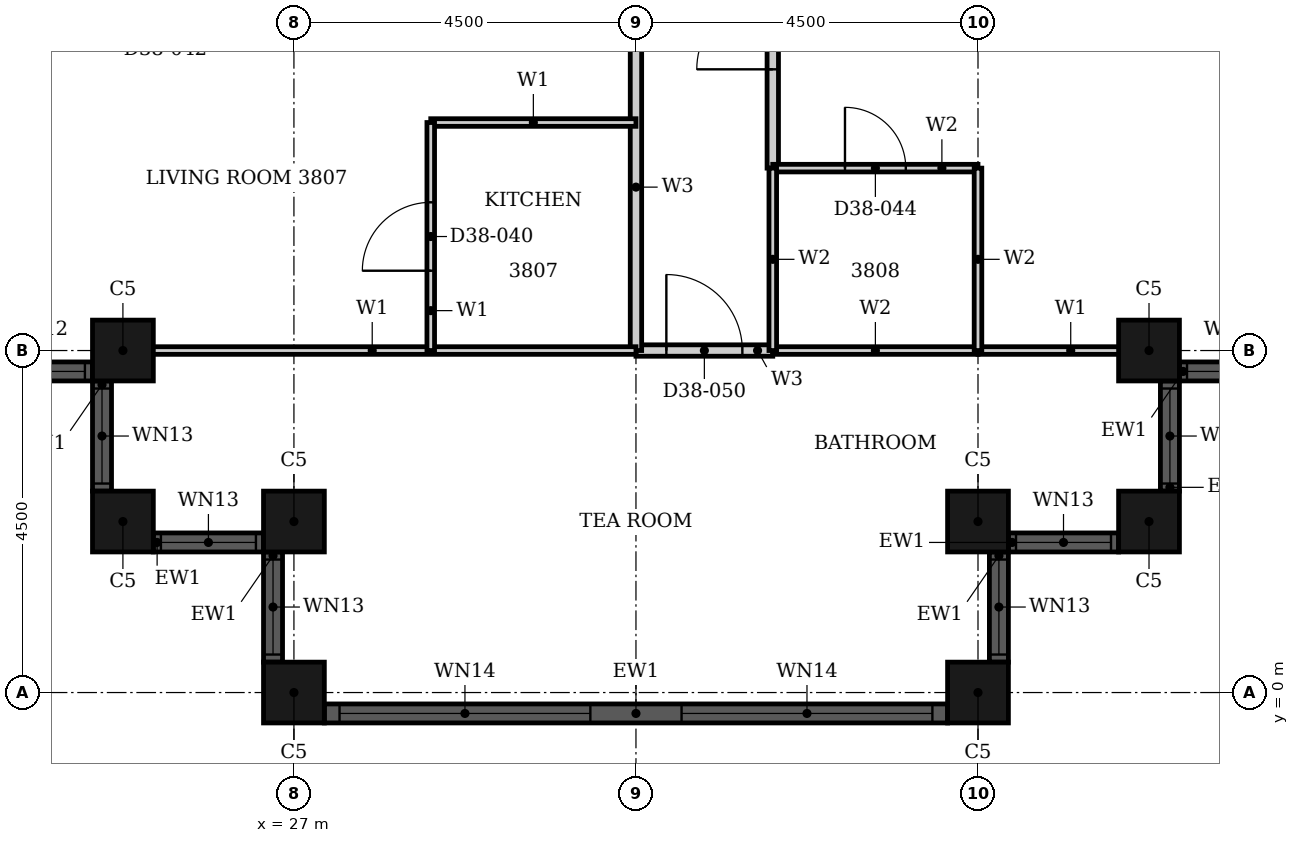
"""IFC4 building model, lengths in metres.
Left out: names, types, materials, properties, quantities, classifications, styles, units other than length and angle.
Written with IfcOpenShell. Run it as: python <this file> out.ifc"""

import sys

from ifc_helpers import new_model, si_unit, direction, frame, frame_2d, origin, origin_2d, place, context, subcontext, project, spatial, rectangle, hollow_rectangle, extrude, element, fill, save


model = new_model("IFC4")
c1 = context("Model", 3, precision=1e-05, world=origin(), true_north=direction((0.0, 1.0)))
c2 = subcontext(c1, "Body", "Model", "MODEL_VIEW")
j1 = project(units=[si_unit("LENGTHUNIT", "METRE"), si_unit("PLANEANGLEUNIT", "RADIAN")], contexts=[c1])
p1 = place(None, origin())
s1 = spatial("IfcSite", under=j1, at=p1, CompositionType="ELEMENT")
p2 = place(p1, origin())
s2 = spatial("IfcBuilding", under=s1, at=p2, CompositionType="ELEMENT")
p3 = place(p2, frame((0.0, 0.0, 154.3)))
s3 = spatial("IfcBuildingStorey", under=s2, at=p3, CompositionType="ELEMENT", Elevation=154.3)
for number, where, z_axis, x_axis in (
    (1, (24.75, 4.5, 0.0), (0.0, 0.0, 1.0), (1.0, 0.0, 0.0)),
    (2, (24.75, 2.25, 0.0), (0.0, 0.0, 1.0), (1.0, 0.0, 0.0)),
    (3, (27.0, 2.25, 0.0), (0.0, 0.0, 1.0), (1.0, 0.0, 0.0)),
    (4, (27.0, 0.0, 0.0), (0.0, 0.0, 1.0), (1.0, 0.0, 0.0)),
    (5, (36.0, 0.0, 0.0), (0.0, 0.0, 1.0), (1.0, 0.0, 0.0)),
    (6, (36.0, 2.25, 0.0), (0.0, 0.0, 1.0), (1.0, 0.0, 0.0)),
    (7, (38.25, 2.25, 0.0), (0.0, 0.0, 1.0), (1.0, 0.0, 0.0)),
    (8, (38.25, 4.5, 0.0), (0.0, 0.0, 1.0), (1.0, 0.0, 0.0)),
):
    element("IfcColumn", number, at=place(p3, frame(where, z_axis=z_axis, x_axis=x_axis)), inside=s3, PredefinedType="COLUMN", context=c2, shape_type="SweptSolid", body=[
        extrude(hollow_rectangle(XDim=0.8, YDim=0.8, WallThickness=0.025, at=origin_2d()), origin(), (0.0, 0.0, 1.0), 3.7),
    ])
p4 = place(p3, frame((22.9, 4.225, 0.0), z_axis=(0.0, 0.0, 1.0), x_axis=(1.0, 0.0, 0.0)))
e9 = element("IfcWall", 9, at=p4, inside=s3, PredefinedType="SOLIDWALL", context=c2, shape_type="SweptSolid", body=[
    extrude(rectangle(XDim=1.45, YDim=0.25, at=frame_2d((0.725, 0.0))), origin(), (0.0, 0.0, 1.0), 3.7),
])
p5 = place(p4, frame((0.1, 0.0, 0.9)))
e10 = element("IfcOpeningElement", 10, at=p5, cuts=e9, PredefinedType="OPENING", context=c2, shape_type="SweptSolid", body=[
    extrude(rectangle(XDim=1.25, YDim=2.08, at=frame_2d((0.625, 1.04))), frame((0.0, 0.135, 0.0), z_axis=(0.0, -1.0, 0.0), x_axis=(1.0, 0.0, 0.0)), (0.0, 0.0, 1.0), 0.27),
])
p6 = place(p3, frame((24.475, 4.1, 0.0), z_axis=(0.0, 0.0, 1.0), x_axis=(0.0, -1.0, 0.0)))
e11 = element("IfcWall", 11, at=p6, inside=s3, PredefinedType="SOLIDWALL", context=c2, shape_type="SweptSolid", body=[
    extrude(rectangle(XDim=1.45, YDim=0.25, at=frame_2d((0.725, 0.0))), origin(), (0.0, 0.0, 1.0), 3.7),
])
p7 = place(p6, frame((0.1, 0.0, 0.9)))
e12 = element("IfcOpeningElement", 12, at=p7, cuts=e11, PredefinedType="OPENING", context=c2, shape_type="SweptSolid", body=[
    extrude(rectangle(XDim=1.25, YDim=1.85, at=frame_2d((0.625, 0.925))), frame((0.0, 0.135, 0.0), z_axis=(0.0, -1.0, 0.0), x_axis=(1.0, 0.0, 0.0)), (0.0, 0.0, 1.0), 0.27),
])
p8 = place(p3, frame((25.15, 1.975, 0.0), z_axis=(0.0, 0.0, 1.0), x_axis=(1.0, 0.0, 0.0)))
e13 = element("IfcWall", 13, at=p8, inside=s3, PredefinedType="SOLIDWALL", context=c2, shape_type="SweptSolid", body=[
    extrude(rectangle(XDim=1.45, YDim=0.25, at=frame_2d((0.725, 0.0))), origin(), (0.0, 0.0, 1.0), 3.7),
])
p9 = place(p8, frame((0.1, 0.0, 0.9)))
e14 = element("IfcOpeningElement", 14, at=p9, cuts=e13, PredefinedType="OPENING", context=c2, shape_type="SweptSolid", body=[
    extrude(rectangle(XDim=1.25, YDim=1.85, at=frame_2d((0.625, 0.925))), frame((0.0, 0.135, 0.0), z_axis=(0.0, -1.0, 0.0), x_axis=(1.0, 0.0, 0.0)), (0.0, 0.0, 1.0), 0.27),
])
p10 = place(p3, frame((26.725, 1.85, 0.0), z_axis=(0.0, 0.0, 1.0), x_axis=(0.0, -1.0, 0.0)))
e15 = element("IfcWall", 15, at=p10, inside=s3, PredefinedType="SOLIDWALL", context=c2, shape_type="SweptSolid", body=[
    extrude(rectangle(XDim=1.45, YDim=0.25, at=frame_2d((0.725, 0.0))), origin(), (0.0, 0.0, 1.0), 3.7),
])
p11 = place(p10, frame((0.1, 0.0, 0.9)))
e16 = element("IfcOpeningElement", 16, at=p11, cuts=e15, PredefinedType="OPENING", context=c2, shape_type="SweptSolid", body=[
    extrude(rectangle(XDim=1.25, YDim=1.85, at=frame_2d((0.625, 0.925))), frame((0.0, 0.135, 0.0), z_axis=(0.0, -1.0, 0.0), x_axis=(1.0, 0.0, 0.0)), (0.0, 0.0, 1.0), 0.27),
])
p12 = place(p3, frame((27.4, -0.275, 0.0), z_axis=(0.0, 0.0, 1.0), x_axis=(1.0, 0.0, 0.0)))
e17 = element("IfcWall", 17, at=p12, inside=s3, PredefinedType="SOLIDWALL", context=c2, shape_type="SweptSolid", body=[
    extrude(rectangle(XDim=8.2, YDim=0.25, at=frame_2d((4.1, 0.0))), origin(), (0.0, 0.0, 1.0), 3.7),
])
p13 = place(p12, frame((0.2, 0.0, 0.45)))
e18 = element("IfcOpeningElement", 18, at=p13, cuts=e17, PredefinedType="OPENING", context=c2, shape_type="SweptSolid", body=[
    extrude(rectangle(XDim=3.3, YDim=2.53, at=frame_2d((1.65, 1.265))), frame((0.0, 0.135, 0.0), z_axis=(0.0, -1.0, 0.0), x_axis=(1.0, 0.0, 0.0)), (0.0, 0.0, 1.0), 0.27),
])
p14 = place(p12, frame((4.7, 0.0, 0.45)))
e19 = element("IfcOpeningElement", 19, at=p14, cuts=e17, PredefinedType="OPENING", context=c2, shape_type="SweptSolid", body=[
    extrude(rectangle(XDim=3.3, YDim=2.53, at=frame_2d((1.65, 1.265))), frame((0.0, 0.135, 0.0), z_axis=(0.0, -1.0, 0.0), x_axis=(1.0, 0.0, 0.0)), (0.0, 0.0, 1.0), 0.27),
])
p15 = place(p3, frame((36.275, 0.4, 0.0), z_axis=(0.0, 0.0, 1.0), x_axis=(0.0, 1.0, 0.0)))
e20 = element("IfcWall", 20, at=p15, inside=s3, PredefinedType="SOLIDWALL", context=c2, shape_type="SweptSolid", body=[
    extrude(rectangle(XDim=1.45, YDim=0.25, at=frame_2d((0.725, 0.0))), origin(), (0.0, 0.0, 1.0), 3.7),
])
p16 = place(p15, frame((0.1, 0.0, 0.9)))
e21 = element("IfcOpeningElement", 21, at=p16, cuts=e20, PredefinedType="OPENING", context=c2, shape_type="SweptSolid", body=[
    extrude(rectangle(XDim=1.25, YDim=1.85, at=frame_2d((0.625, 0.925))), frame((0.0, 0.135, 0.0), z_axis=(0.0, -1.0, 0.0), x_axis=(1.0, 0.0, 0.0)), (0.0, 0.0, 1.0), 0.27),
])
p17 = place(p3, frame((36.4, 1.975, 0.0), z_axis=(0.0, 0.0, 1.0), x_axis=(1.0, 0.0, 0.0)))
e22 = element("IfcWall", 22, at=p17, inside=s3, PredefinedType="SOLIDWALL", context=c2, shape_type="SweptSolid", body=[
    extrude(rectangle(XDim=1.45, YDim=0.25, at=frame_2d((0.725, 0.0))), origin(), (0.0, 0.0, 1.0), 3.7),
])
p18 = place(p17, frame((0.1, 0.0, 0.9)))
e23 = element("IfcOpeningElement", 23, at=p18, cuts=e22, PredefinedType="OPENING", context=c2, shape_type="SweptSolid", body=[
    extrude(rectangle(XDim=1.25, YDim=1.85, at=frame_2d((0.625, 0.925))), frame((0.0, 0.135, 0.0), z_axis=(0.0, -1.0, 0.0), x_axis=(1.0, 0.0, 0.0)), (0.0, 0.0, 1.0), 0.27),
])
p19 = place(p3, frame((38.525, 2.65, 0.0), z_axis=(0.0, 0.0, 1.0), x_axis=(0.0, 1.0, 0.0)))
e24 = element("IfcWall", 24, at=p19, inside=s3, PredefinedType="SOLIDWALL", context=c2, shape_type="SweptSolid", body=[
    extrude(rectangle(XDim=1.45, YDim=0.25, at=frame_2d((0.725, 0.0))), origin(), (0.0, 0.0, 1.0), 3.7),
])
p20 = place(p19, frame((0.1, 0.0, 0.9)))
e25 = element("IfcOpeningElement", 25, at=p20, cuts=e24, PredefinedType="OPENING", context=c2, shape_type="SweptSolid", body=[
    extrude(rectangle(XDim=1.25, YDim=1.85, at=frame_2d((0.625, 0.925))), frame((0.0, 0.135, 0.0), z_axis=(0.0, -1.0, 0.0), x_axis=(1.0, 0.0, 0.0)), (0.0, 0.0, 1.0), 0.27),
])
p21 = place(p3, frame((38.65, 4.225, 0.0), z_axis=(0.0, 0.0, 1.0), x_axis=(1.0, 0.0, 0.0)))
e26 = element("IfcWall", 26, at=p21, inside=s3, PredefinedType="SOLIDWALL", context=c2, shape_type="SweptSolid", body=[
    extrude(rectangle(XDim=1.45, YDim=0.25, at=frame_2d((0.725, 0.0))), origin(), (0.0, 0.0, 1.0), 3.7),
])
p22 = place(p21, frame((0.1, 0.0, 0.9)))
e27 = element("IfcOpeningElement", 27, at=p22, cuts=e26, PredefinedType="OPENING", context=c2, shape_type="SweptSolid", body=[
    extrude(rectangle(XDim=1.25, YDim=2.08, at=frame_2d((0.625, 1.04))), frame((0.0, 0.135, 0.0), z_axis=(0.0, -1.0, 0.0), x_axis=(1.0, 0.0, 0.0)), (0.0, 0.0, 1.0), 0.27),
])
p23 = place(p3, frame((31.5, 4.5, 0.0), z_axis=(0.0, 0.0, 1.0), x_axis=(1.0, 0.0, 0.0)))
e28 = element("IfcWall", 28, at=p23, inside=s3, PredefinedType="PARTITIONING", context=c2, shape_type="SweptSolid", body=[
    extrude(rectangle(XDim=1.8, YDim=0.15, at=frame_2d((0.9, 0.0))), origin(), (0.0, 0.0, 1.0), 3.4),
])
p24 = place(p23, frame((0.4, 0.0, 0.0)))
e29 = element("IfcOpeningElement", 29, at=p24, cuts=e28, PredefinedType="OPENING", context=c2, shape_type="SweptSolid", body=[
    extrude(rectangle(XDim=1.0, YDim=2.1, at=frame_2d((0.5, 1.05))), frame((0.0, 0.085, 0.0), z_axis=(0.0, -1.0, 0.0), x_axis=(1.0, 0.0, 0.0)), (0.0, 0.0, 1.0), 0.17),
])
p25 = place(p3, frame((31.5, 4.5, 0.0), z_axis=(0.0, 0.0, 1.0), x_axis=(0.0, 1.0, 0.0)))
e30 = element("IfcWall", 30, at=p25, inside=s3, PredefinedType="PARTITIONING", context=c2, shape_type="SweptSolid", body=[
    extrude(rectangle(XDim=6.6, YDim=0.15, at=frame_2d((3.3, 0.0))), origin(), (0.0, 0.0, 1.0), 2.68),
])
p26 = place(p25, frame((4.3, 0.0, 0.0)))
e31 = element("IfcOpeningElement", 31, at=p26, cuts=e30, PredefinedType="OPENING", context=c2, shape_type="SweptSolid", body=[
    extrude(rectangle(XDim=1.0, YDim=2.2, at=frame_2d((0.5, 1.1))), frame((0.0, 0.085, 0.0), z_axis=(0.0, -1.0, 0.0), x_axis=(1.0, 0.0, 0.0)), (0.0, 0.0, 1.0), 0.17),
])
p27 = place(p3, frame((33.3, 6.9, 0.0), z_axis=(0.0, 0.0, 1.0), x_axis=(0.0, 1.0, 0.0)))
e32 = element("IfcWall", 32, at=p27, inside=s3, PredefinedType="PARTITIONING", context=c2, shape_type="SweptSolid", body=[
    extrude(rectangle(XDim=13.799, YDim=0.15, at=frame_2d((6.899, 0.0))), origin(), (0.0, 0.0, 1.0), 3.4),
])
p28 = place(p27, frame((9.699, 0.0, 0.0)))
e33 = element("IfcOpeningElement", 33, at=p28, cuts=e32, PredefinedType="OPENING", context=c2, shape_type="SweptSolid", body=[
    extrude(rectangle(XDim=1.0, YDim=2.2, at=frame_2d((0.5, 1.1))), frame((0.0, 0.085, 0.0), z_axis=(0.0, -1.0, 0.0), x_axis=(1.0, 0.0, 0.0)), (0.0, 0.0, 1.0), 0.17),
])
p29 = place(p27, frame((1.3, 0.0, 0.0)))
e34 = element("IfcOpeningElement", 34, at=p29, cuts=e32, PredefinedType="OPENING", context=c2, shape_type="SweptSolid", body=[
    extrude(rectangle(XDim=1.0, YDim=2.2, at=frame_2d((0.5, 1.1))), frame((0.0, 0.085, 0.0), z_axis=(0.0, -1.0, 0.0), x_axis=(1.0, 0.0, 0.0)), (0.0, 0.0, 1.0), 0.17),
])
p30 = place(p3, frame((36.0, 4.5, 0.0), z_axis=(0.0, 0.0, 1.0), x_axis=(1.0, 0.0, 0.0)))
e35 = element("IfcWall", 35, at=p30, inside=s3, PredefinedType="PARTITIONING", context=c2, shape_type="SweptSolid", body=[
    extrude(rectangle(XDim=2.44, YDim=0.1, at=frame_2d((1.22, 0.0))), origin(), (0.0, 0.0, 1.0), 3.4),
])
p31 = place(p3, frame((24.56, 4.5, 0.0), z_axis=(0.0, 0.0, 1.0), x_axis=(1.0, 0.0, 0.0)))
e36 = element("IfcWall", 36, at=p31, inside=s3, PredefinedType="PARTITIONING", context=c2, shape_type="SweptSolid", body=[
    extrude(rectangle(XDim=6.94, YDim=0.1, at=frame_2d((3.47, 0.0))), origin(), (0.0, 0.0, 1.0), 3.4),
])
p32 = place(p3, frame((28.8, 7.5, 0.0), z_axis=(0.0, 0.0, 1.0), x_axis=(1.0, 0.0, 0.0)))
e37 = element("IfcWall", 37, at=p32, inside=s3, PredefinedType="PARTITIONING", context=c2, shape_type="SweptSolid", body=[
    extrude(rectangle(XDim=2.7, YDim=0.1, at=frame_2d((1.35, 0.0))), origin(), (0.0, 0.0, 1.0), 3.4),
])
p33 = place(p3, frame((28.8, 4.5, 0.0), z_axis=(0.0, 0.0, 1.0), x_axis=(0.0, 1.0, 0.0)))
e38 = element("IfcWall", 38, at=p33, inside=s3, PredefinedType="PARTITIONING", context=c2, shape_type="SweptSolid", body=[
    extrude(rectangle(XDim=3.0, YDim=0.1, at=frame_2d((1.5, 0.0))), origin(), (0.0, 0.0, 1.0), 3.4),
])
p34 = place(p33, frame((1.05, 0.0, 0.0)))
e39 = element("IfcOpeningElement", 39, at=p34, cuts=e38, PredefinedType="OPENING", context=c2, shape_type="SweptSolid", body=[
    extrude(rectangle(XDim=0.9, YDim=2.1, at=frame_2d((0.45, 1.05))), frame((0.0, 0.06, 0.0), z_axis=(0.0, -1.0, 0.0), x_axis=(1.0, 0.0, 0.0)), (0.0, 0.0, 1.0), 0.12),
])
p35 = place(p3, frame((33.3, 4.5, 0.0), z_axis=(0.0, 0.0, 1.0), x_axis=(1.0, 0.0, 0.0)))
e40 = element("IfcWall", 40, at=p35, inside=s3, PredefinedType="PARTITIONING", context=c2, shape_type="SweptSolid", body=[
    extrude(rectangle(XDim=2.7, YDim=0.1, at=frame_2d((1.35, 0.0))), origin(), (0.0, 0.0, 1.0), 3.4),
])
p36 = place(p3, frame((33.3, 6.9, 0.0), z_axis=(0.0, 0.0, 1.0), x_axis=(1.0, 0.0, 0.0)))
e41 = element("IfcWall", 41, at=p36, inside=s3, PredefinedType="PARTITIONING", context=c2, shape_type="SweptSolid", body=[
    extrude(rectangle(XDim=2.7, YDim=0.1, at=frame_2d((1.35, 0.0))), origin(), (0.0, 0.0, 1.0), 3.4),
])
p37 = place(p36, frame((0.95, 0.0, 0.0)))
e42 = element("IfcOpeningElement", 42, at=p37, cuts=e41, PredefinedType="OPENING", context=c2, shape_type="SweptSolid", body=[
    extrude(rectangle(XDim=0.8, YDim=2.1, at=frame_2d((0.4, 1.05))), frame((0.0, 0.06, 0.0), z_axis=(0.0, -1.0, 0.0), x_axis=(1.0, 0.0, 0.0)), (0.0, 0.0, 1.0), 0.12),
])
p38 = place(p3, frame((33.3, 4.5, 0.0), z_axis=(0.0, 0.0, 1.0), x_axis=(0.0, 1.0, 0.0)))
e43 = element("IfcWall", 43, at=p38, inside=s3, PredefinedType="PARTITIONING", context=c2, shape_type="SweptSolid", body=[
    extrude(rectangle(XDim=2.4, YDim=0.1, at=frame_2d((1.2, 0.0))), origin(), (0.0, 0.0, 1.0), 3.4),
])
p39 = place(p3, frame((36.0, 4.5, 0.0), z_axis=(0.0, 0.0, 1.0), x_axis=(0.0, 1.0, 0.0)))
e44 = element("IfcWall", 44, at=p39, inside=s3, PredefinedType="PARTITIONING", context=c2, shape_type="SweptSolid", body=[
    extrude(rectangle(XDim=2.4, YDim=0.1, at=frame_2d((1.2, 0.0))), origin(), (0.0, 0.0, 1.0), 2.68),
])
p40 = place(p5, origin())
e45 = element("IfcWindow", 45, at=p40, inside=s3, PartitioningType="SINGLE_PANEL", PredefinedType="WINDOW", context=c2, shape_type="SweptSolid", body=[
    extrude(rectangle(XDim=1.25, YDim=2.08, at=frame_2d((0.625, 1.04))), frame((0.0, 0.03, 0.0), z_axis=(0.0, -1.0, 0.0), x_axis=(1.0, 0.0, 0.0)), (0.0, 0.0, 1.0), 0.06),
])
fill(e10, e45)
p41 = place(p7, origin())
e46 = element("IfcWindow", 46, at=p41, inside=s3, PartitioningType="SINGLE_PANEL", PredefinedType="WINDOW", context=c2, shape_type="SweptSolid", body=[
    extrude(rectangle(XDim=1.25, YDim=1.85, at=frame_2d((0.625, 0.925))), frame((0.0, 0.03, 0.0), z_axis=(0.0, -1.0, 0.0), x_axis=(1.0, 0.0, 0.0)), (0.0, 0.0, 1.0), 0.06),
])
fill(e12, e46)
p42 = place(p9, origin())
e47 = element("IfcWindow", 47, at=p42, inside=s3, PartitioningType="SINGLE_PANEL", PredefinedType="WINDOW", context=c2, shape_type="SweptSolid", body=[
    extrude(rectangle(XDim=1.25, YDim=1.85, at=frame_2d((0.625, 0.925))), frame((0.0, 0.03, 0.0), z_axis=(0.0, -1.0, 0.0), x_axis=(1.0, 0.0, 0.0)), (0.0, 0.0, 1.0), 0.06),
])
fill(e14, e47)
p43 = place(p11, origin())
e48 = element("IfcWindow", 48, at=p43, inside=s3, PartitioningType="SINGLE_PANEL", PredefinedType="WINDOW", context=c2, shape_type="SweptSolid", body=[
    extrude(rectangle(XDim=1.25, YDim=1.85, at=frame_2d((0.625, 0.925))), frame((0.0, 0.03, 0.0), z_axis=(0.0, -1.0, 0.0), x_axis=(1.0, 0.0, 0.0)), (0.0, 0.0, 1.0), 0.06),
])
fill(e16, e48)
p44 = place(p13, origin())
e49 = element("IfcWindow", 49, at=p44, inside=s3, PartitioningType="SINGLE_PANEL", PredefinedType="WINDOW", context=c2, shape_type="SweptSolid", body=[
    extrude(rectangle(XDim=3.3, YDim=2.53, at=frame_2d((1.65, 1.265))), frame((0.0, 0.03, 0.0), z_axis=(0.0, -1.0, 0.0), x_axis=(1.0, 0.0, 0.0)), (0.0, 0.0, 1.0), 0.06),
])
fill(e18, e49)
p45 = place(p14, origin())
e50 = element("IfcWindow", 50, at=p45, inside=s3, PartitioningType="SINGLE_PANEL", PredefinedType="WINDOW", context=c2, shape_type="SweptSolid", body=[
    extrude(rectangle(XDim=3.3, YDim=2.53, at=frame_2d((1.65, 1.265))), frame((0.0, 0.03, 0.0), z_axis=(0.0, -1.0, 0.0), x_axis=(1.0, 0.0, 0.0)), (0.0, 0.0, 1.0), 0.06),
])
fill(e19, e50)
p46 = place(p16, origin())
e51 = element("IfcWindow", 51, at=p46, inside=s3, PartitioningType="SINGLE_PANEL", PredefinedType="WINDOW", context=c2, shape_type="SweptSolid", body=[
    extrude(rectangle(XDim=1.25, YDim=1.85, at=frame_2d((0.625, 0.925))), frame((0.0, 0.03, 0.0), z_axis=(0.0, -1.0, 0.0), x_axis=(1.0, 0.0, 0.0)), (0.0, 0.0, 1.0), 0.06),
])
fill(e21, e51)
p47 = place(p18, origin())
e52 = element("IfcWindow", 52, at=p47, inside=s3, PartitioningType="SINGLE_PANEL", PredefinedType="WINDOW", context=c2, shape_type="SweptSolid", body=[
    extrude(rectangle(XDim=1.25, YDim=1.85, at=frame_2d((0.625, 0.925))), frame((0.0, 0.03, 0.0), z_axis=(0.0, -1.0, 0.0), x_axis=(1.0, 0.0, 0.0)), (0.0, 0.0, 1.0), 0.06),
])
fill(e23, e52)
p48 = place(p20, origin())
e53 = element("IfcWindow", 53, at=p48, inside=s3, PartitioningType="SINGLE_PANEL", PredefinedType="WINDOW", context=c2, shape_type="SweptSolid", body=[
    extrude(rectangle(XDim=1.25, YDim=1.85, at=frame_2d((0.625, 0.925))), frame((0.0, 0.03, 0.0), z_axis=(0.0, -1.0, 0.0), x_axis=(1.0, 0.0, 0.0)), (0.0, 0.0, 1.0), 0.06),
])
fill(e25, e53)
p49 = place(p22, origin())
e54 = element("IfcWindow", 54, at=p49, inside=s3, PartitioningType="SINGLE_PANEL", PredefinedType="WINDOW", context=c2, shape_type="SweptSolid", body=[
    extrude(rectangle(XDim=1.25, YDim=2.08, at=frame_2d((0.625, 1.04))), frame((0.0, 0.03, 0.0), z_axis=(0.0, -1.0, 0.0), x_axis=(1.0, 0.0, 0.0)), (0.0, 0.0, 1.0), 0.06),
])
fill(e27, e54)
p50 = place(p34, origin())
e55 = element("IfcDoor", 55, at=p50, inside=s3, OperationType="SINGLE_SWING_RIGHT", PredefinedType="DOOR", context=c2, shape_type="SweptSolid", body=[
    extrude(rectangle(XDim=0.9, YDim=2.1, at=frame_2d((0.45, 1.05))), frame((0.0, 0.025, 0.0), z_axis=(0.0, -1.0, 0.0), x_axis=(1.0, 0.0, 0.0)), (0.0, 0.0, 1.0), 0.05),
])
fill(e39, e55)
p51 = place(p29, origin())
e56 = element("IfcDoor", 56, at=p51, inside=s3, OperationType="SINGLE_SWING_RIGHT", PredefinedType="DOOR", context=c2, shape_type="SweptSolid", body=[
    extrude(rectangle(XDim=1.0, YDim=2.2, at=frame_2d((0.5, 1.1))), frame((0.0, 0.025, 0.0), z_axis=(0.0, -1.0, 0.0), x_axis=(1.0, 0.0, 0.0)), (0.0, 0.0, 1.0), 0.05),
])
fill(e34, e56)
p52 = place(p37, origin())
e57 = element("IfcDoor", 57, at=p52, inside=s3, OperationType="SINGLE_SWING_RIGHT", PredefinedType="DOOR", context=c2, shape_type="SweptSolid", body=[
    extrude(rectangle(XDim=0.8, YDim=2.1, at=frame_2d((0.4, 1.05))), frame((0.0, 0.025, 0.0), z_axis=(0.0, -1.0, 0.0), x_axis=(1.0, 0.0, 0.0)), (0.0, 0.0, 1.0), 0.05),
])
fill(e42, e57)
p53 = place(p24, origin())
e58 = element("IfcDoor", 58, at=p53, inside=s3, OperationType="SINGLE_SWING_RIGHT", PredefinedType="DOOR", context=c2, shape_type="SweptSolid", body=[
    extrude(rectangle(XDim=1.0, YDim=2.1, at=frame_2d((0.5, 1.05))), frame((0.0, 0.025, 0.0), z_axis=(0.0, -1.0, 0.0), x_axis=(1.0, 0.0, 0.0)), (0.0, 0.0, 1.0), 0.05),
])
fill(e29, e58)
save(model, sys.argv[1])
